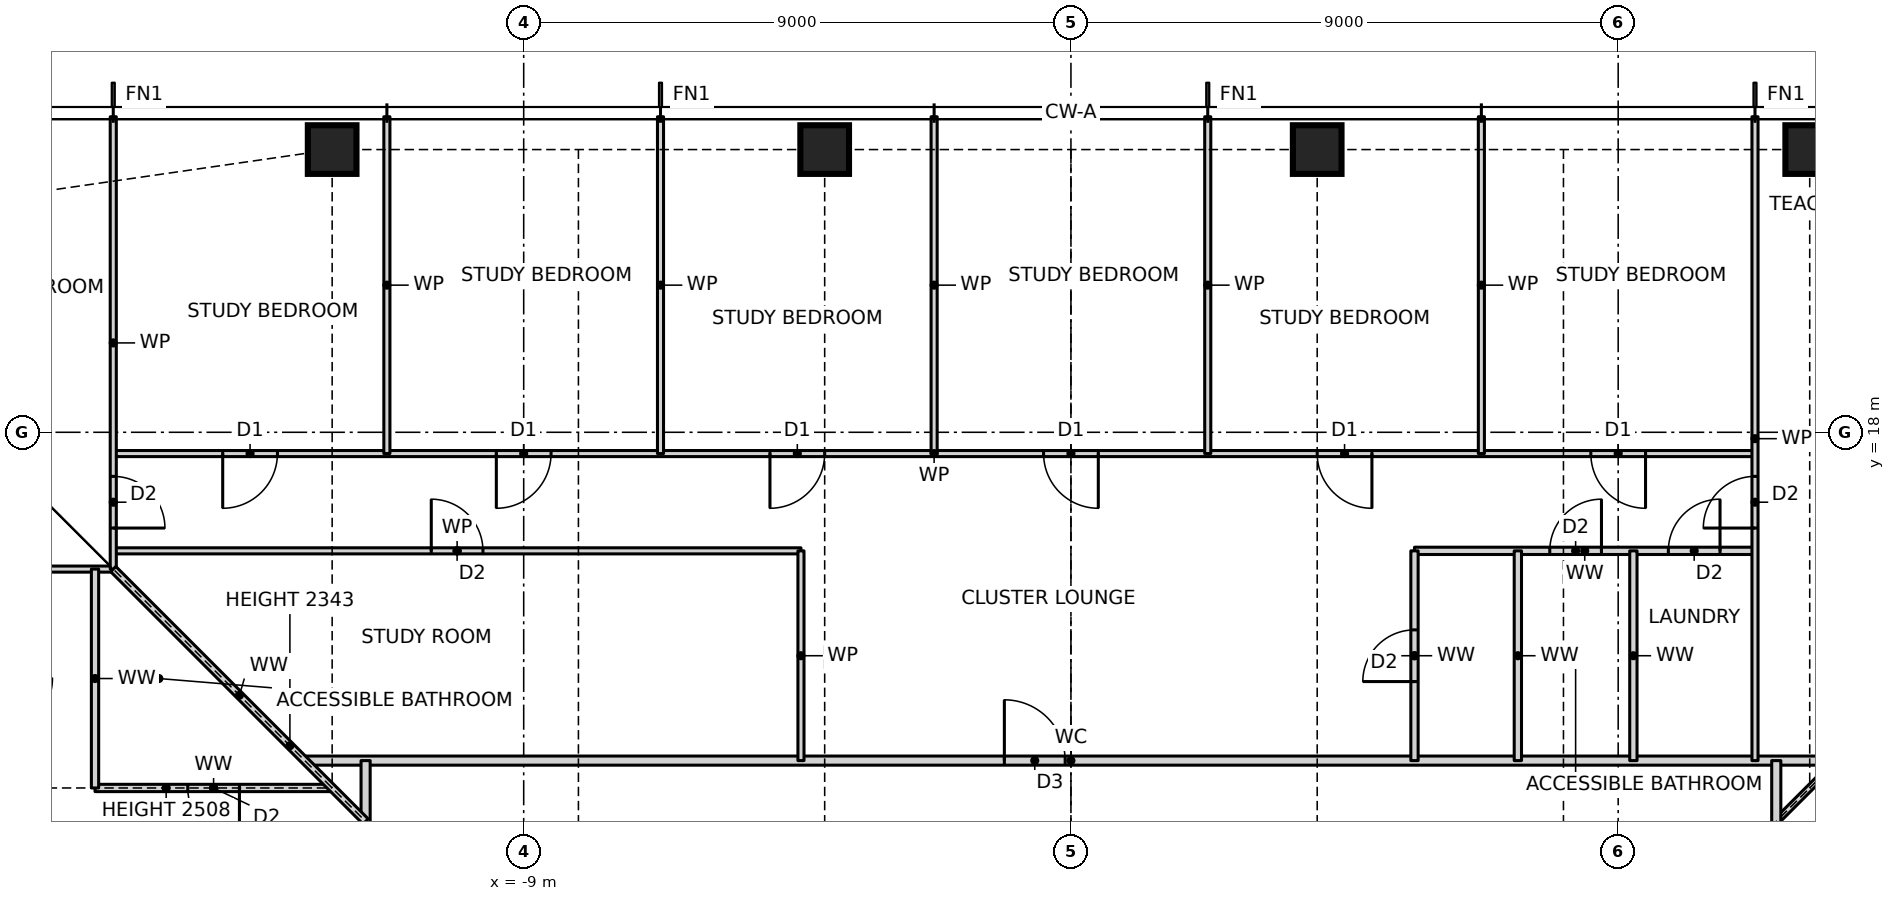
"""IFC4 building model, lengths in metres.
Left out: names, types, materials, properties, quantities, classifications, styles, units other than length and angle.
Written with IfcOpenShell. Run it as: python <this file> out.ifc"""

import sys

from ifc_helpers import new_model, si_unit, direction, frame, frame_2d, origin, origin_2d, place, context, subcontext, project, spatial, rectangle, hollow_rectangle, extrude, element, fill, save


model = new_model("IFC4")
c1 = context("Model", 3, precision=1e-05, world=origin(), true_north=direction((0.0, 1.0)))
c2 = subcontext(c1, "Body", "Model", "MODEL_VIEW")
j1 = project(units=[si_unit("LENGTHUNIT", "METRE"), si_unit("PLANEANGLEUNIT", "RADIAN")], contexts=[c1])
p1 = place(None, origin())
s1 = spatial("IfcSite", under=j1, at=p1, CompositionType="ELEMENT")
p2 = place(p1, origin())
s2 = spatial("IfcBuilding", under=s1, at=p2, CompositionType="ELEMENT")
p3 = place(p2, frame((0.0, 0.0, 57.0)))
s3 = spatial("IfcBuildingStorey", under=s2, at=p3, CompositionType="ELEMENT", Elevation=57.0)
for number, where, z_axis, x_axis in (
    (1, (12.15, 22.65, 0.0), (0.0, 0.0, 1.0), (1.0, 0.0, 0.0)),
    (2, (4.05, 22.65, 0.0), (0.0, 0.0, 1.0), (1.0, 0.0, 0.0)),
    (3, (-4.05, 22.65, 0.0), (0.0, 0.0, 1.0), (1.0, 0.0, 0.0)),
    (4, (-12.15, 22.65, 0.0), (0.0, 0.0, 1.0), (1.0, 0.0, 0.0)),
):
    element("IfcColumn", number, at=place(p3, frame(where, z_axis=z_axis, x_axis=x_axis)), inside=s3, PredefinedType="COLUMN", context=c2, shape_type="SweptSolid", body=[
        extrude(hollow_rectangle(XDim=0.8, YDim=0.8, WallThickness=0.09, at=origin_2d()), origin(), (0.0, 0.0, 1.0), 3.5),
    ])
p4 = place(p3, frame((-16.05, 12.15, 0.0), z_axis=(0.0, 0.0, 1.0), x_axis=(1.0, 0.0, 0.0)))
e5 = element("IfcWall", 5, at=p4, inside=s3, PredefinedType="PARTITIONING", context=c2, shape_type="SweptSolid", body=[
    extrude(rectangle(XDim=3.9, YDim=0.12, at=frame_2d((1.95, 0.0))), origin(), (0.0, 0.0, 1.0), 2.508),
])
p5 = place(p4, frame((1.525, 0.0, 0.0)))
e6 = element("IfcOpeningElement", 6, at=p5, cuts=e5, PredefinedType="OPENING", context=c2, shape_type="SweptSolid", body=[
    extrude(rectangle(XDim=0.85, YDim=2.1, at=frame_2d((0.425, 1.05))), frame((0.0, 0.07, 0.0), z_axis=(0.0, -1.0, 0.0), x_axis=(1.0, 0.0, 0.0)), (0.0, 0.0, 1.0), 0.14),
])
p6 = place(p3, frame((-12.6, 12.6, 0.0), z_axis=(0.0, 0.0, 1.0), x_axis=(1.0, 0.0, 0.0)))
e7 = element("IfcWall", 7, at=p6, inside=s3, PredefinedType="PARTITIONING", context=c2, shape_type="SweptSolid", body=[
    extrude(rectangle(XDim=25.2, YDim=0.15, at=frame_2d((12.6, 0.0))), origin(), (0.0, 0.0, 1.0), 3.27),
])
p7 = place(p6, frame((11.505, 0.0, 0.0)))
e8 = element("IfcOpeningElement", 8, at=p7, cuts=e7, PredefinedType="OPENING", context=c2, shape_type="SweptSolid", body=[
    extrude(rectangle(XDim=1.0, YDim=2.1, at=frame_2d((0.5, 1.05))), frame((0.0, 0.085, 0.0), z_axis=(0.0, -1.0, 0.0), x_axis=(1.0, 0.0, 0.0)), (0.0, 0.0, 1.0), 0.17),
])
p8 = place(p3, frame((-23.19, 15.75, 0.0), z_axis=(0.0, 0.0, 1.0), x_axis=(1.0, 0.0, 0.0)))
e9 = element("IfcWall", 9, at=p8, inside=s3, PredefinedType="PARTITIONING", context=c2, shape_type="SweptSolid", body=[
    extrude(rectangle(XDim=7.44, YDim=0.1, at=frame_2d((3.72, 0.0))), origin(), (0.0, 0.0, 1.0), 3.27),
])
p9 = place(p3, frame((-15.75, 16.05, 0.0), z_axis=(0.0, 0.0, 1.0), x_axis=(1.0, 0.0, 0.0)))
e10 = element("IfcWall", 10, at=p9, inside=s3, PredefinedType="PARTITIONING", context=c2, shape_type="SweptSolid", body=[
    extrude(rectangle(XDim=11.31, YDim=0.1, at=frame_2d((5.655, 0.0))), origin(), (0.0, 0.0, 1.0), 3.27),
])
p10 = place(p9, frame((5.23, 0.0, 0.0)))
e11 = element("IfcOpeningElement", 11, at=p10, cuts=e10, PredefinedType="OPENING", context=c2, shape_type="SweptSolid", body=[
    extrude(rectangle(XDim=0.85, YDim=2.1, at=frame_2d((0.425, 1.05))), frame((0.0, 0.06, 0.0), z_axis=(0.0, -1.0, 0.0), x_axis=(1.0, 0.0, 0.0)), (0.0, 0.0, 1.0), 0.12),
])
p11 = place(p3, frame((5.65, 16.05, 0.0), z_axis=(0.0, 0.0, 1.0), x_axis=(1.0, 0.0, 0.0)))
e12 = element("IfcWall", 12, at=p11, inside=s3, PredefinedType="PARTITIONING", context=c2, shape_type="SweptSolid", body=[
    extrude(rectangle(XDim=5.6, YDim=0.12, at=frame_2d((2.8, 0.0))), origin(), (0.0, 0.0, 1.0), 3.27),
])
p12 = place(p11, frame((4.175, 0.0, 0.0)))
e13 = element("IfcOpeningElement", 13, at=p12, cuts=e12, PredefinedType="OPENING", context=c2, shape_type="SweptSolid", body=[
    extrude(rectangle(XDim=0.85, YDim=2.1, at=frame_2d((0.425, 1.05))), frame((0.0, 0.07, 0.0), z_axis=(0.0, -1.0, 0.0), x_axis=(1.0, 0.0, 0.0)), (0.0, 0.0, 1.0), 0.14),
])
p13 = place(p11, frame((2.225, 0.0, 0.0)))
e14 = element("IfcOpeningElement", 14, at=p13, cuts=e12, PredefinedType="OPENING", context=c2, shape_type="SweptSolid", body=[
    extrude(rectangle(XDim=0.85, YDim=2.1, at=frame_2d((0.425, 1.05))), frame((0.0, 0.07, 0.0), z_axis=(0.0, -1.0, 0.0), x_axis=(1.0, 0.0, 0.0)), (0.0, 0.0, 1.0), 0.14),
])
p14 = place(p3, frame((-15.75, 17.65, 0.0), z_axis=(0.0, 0.0, 1.0), x_axis=(1.0, 0.0, 0.0)))
e15 = element("IfcWall", 15, at=p14, inside=s3, PredefinedType="PARTITIONING", context=c2, shape_type="SweptSolid", body=[
    extrude(rectangle(XDim=27.0, YDim=0.1, at=frame_2d((13.5, 0.0))), origin(), (0.0, 0.0, 1.0), 3.27),
])
p15 = place(p14, frame((24.3, 0.0, 0.0)))
e16 = element("IfcOpeningElement", 16, at=p15, cuts=e15, PredefinedType="OPENING", context=c2, shape_type="SweptSolid", body=[
    extrude(rectangle(XDim=0.9, YDim=2.1, at=frame_2d((0.45, 1.05))), frame((0.0, 0.06, 0.0), z_axis=(0.0, -1.0, 0.0), x_axis=(1.0, 0.0, 0.0)), (0.0, 0.0, 1.0), 0.12),
])
p16 = place(p14, frame((19.8, 0.0, 0.0)))
e17 = element("IfcOpeningElement", 17, at=p16, cuts=e15, PredefinedType="OPENING", context=c2, shape_type="SweptSolid", body=[
    extrude(rectangle(XDim=0.9, YDim=2.1, at=frame_2d((0.45, 1.05))), frame((0.0, 0.06, 0.0), z_axis=(0.0, -1.0, 0.0), x_axis=(1.0, 0.0, 0.0)), (0.0, 0.0, 1.0), 0.12),
])
p17 = place(p14, frame((15.3, 0.0, 0.0)))
e18 = element("IfcOpeningElement", 18, at=p17, cuts=e15, PredefinedType="OPENING", context=c2, shape_type="SweptSolid", body=[
    extrude(rectangle(XDim=0.9, YDim=2.1, at=frame_2d((0.45, 1.05))), frame((0.0, 0.06, 0.0), z_axis=(0.0, -1.0, 0.0), x_axis=(1.0, 0.0, 0.0)), (0.0, 0.0, 1.0), 0.12),
])
p18 = place(p14, frame((10.8, 0.0, 0.0)))
e19 = element("IfcOpeningElement", 19, at=p18, cuts=e15, PredefinedType="OPENING", context=c2, shape_type="SweptSolid", body=[
    extrude(rectangle(XDim=0.9, YDim=2.1, at=frame_2d((0.45, 1.05))), frame((0.0, 0.06, 0.0), z_axis=(0.0, -1.0, 0.0), x_axis=(1.0, 0.0, 0.0)), (0.0, 0.0, 1.0), 0.12),
])
p19 = place(p14, frame((6.3, 0.0, 0.0)))
e20 = element("IfcOpeningElement", 20, at=p19, cuts=e15, PredefinedType="OPENING", context=c2, shape_type="SweptSolid", body=[
    extrude(rectangle(XDim=0.9, YDim=2.1, at=frame_2d((0.45, 1.05))), frame((0.0, 0.06, 0.0), z_axis=(0.0, -1.0, 0.0), x_axis=(1.0, 0.0, 0.0)), (0.0, 0.0, 1.0), 0.12),
])
p20 = place(p14, frame((1.8, 0.0, 0.0)))
e21 = element("IfcOpeningElement", 21, at=p20, cuts=e15, PredefinedType="OPENING", context=c2, shape_type="SweptSolid", body=[
    extrude(rectangle(XDim=0.9, YDim=2.1, at=frame_2d((0.45, 1.05))), frame((0.0, 0.06, 0.0), z_axis=(0.0, -1.0, 0.0), x_axis=(1.0, 0.0, 0.0)), (0.0, 0.0, 1.0), 0.12),
])
p21 = place(p3, frame((11.6, 11.6, 0.0), z_axis=(0.0, 0.0, 1.0), x_axis=(0.707106781187, 0.707106781187, 0.0)))
e22 = element("IfcWall", 22, at=p21, inside=s3, PredefinedType="PARTITIONING", context=c2, shape_type="SweptSolid", body=[
    extrude(rectangle(XDim=5.869, YDim=0.1, at=frame_2d((2.935, 0.0))), origin(), (0.0, 0.0, 1.0), 2.343),
])
p22 = place(p3, frame((11.6, -11.6, 0.0), z_axis=(0.0, 0.0, 1.0), x_axis=(0.0, 1.0, 0.0)))
e23 = element("IfcWall", 23, at=p22, inside=s3, PredefinedType="PARTITIONING", context=c2, shape_type="SweptSolid", body=[
    extrude(rectangle(XDim=24.2, YDim=0.15, at=frame_2d((12.1, 0.0))), origin(), (0.0, 0.0, 1.0), 3.27),
])
p23 = place(p22, frame((16.05, 0.0, 0.0)))
e24 = element("IfcOpeningElement", 24, at=p23, cuts=e23, PredefinedType="OPENING", context=c2, shape_type="SweptSolid", body=[
    extrude(rectangle(XDim=1.0, YDim=2.1, at=frame_2d((0.5, 1.05))), frame((0.0, 0.085, 0.0), z_axis=(0.0, -1.0, 0.0), x_axis=(1.0, 0.0, 0.0)), (0.0, 0.0, 1.0), 0.17),
])
p24 = place(p3, frame((11.25, 12.6, 0.0), z_axis=(0.0, 0.0, 1.0), x_axis=(0.0, 1.0, 0.0)))
e25 = element("IfcWall", 25, at=p24, inside=s3, PredefinedType="PARTITIONING", context=c2, shape_type="SweptSolid", body=[
    extrude(rectangle(XDim=10.59, YDim=0.1, at=frame_2d((5.295, 0.0))), origin(), (0.0, 0.0, 1.0), 3.27),
])
p25 = place(p24, frame((3.825, 0.0, 0.0)))
e26 = element("IfcOpeningElement", 26, at=p25, cuts=e25, PredefinedType="OPENING", context=c2, shape_type="SweptSolid", body=[
    extrude(rectangle(XDim=0.85, YDim=2.1, at=frame_2d((0.425, 1.05))), frame((0.0, 0.06, 0.0), z_axis=(0.0, -1.0, 0.0), x_axis=(1.0, 0.0, 0.0)), (0.0, 0.0, 1.0), 0.12),
])
for number, where, z_axis, x_axis in (
    (27, (9.25, 12.6, 0.0), (0.0, 0.0, 1.0), (0.0, 1.0, 0.0)),
    (28, (7.35, 12.6, 0.0), (0.0, 0.0, 1.0), (0.0, 1.0, 0.0)),
):
    element("IfcWall", number, at=place(p3, frame(where, z_axis=z_axis, x_axis=x_axis)), inside=s3, PredefinedType="PARTITIONING", context=c2, shape_type="SweptSolid", body=[
        extrude(rectangle(XDim=3.45, YDim=0.12, at=frame_2d((1.725, 0.0))), origin(), (0.0, 0.0, 1.0), 3.27),
    ])
p26 = place(p3, frame((6.75, 17.65, 0.0), z_axis=(0.0, 0.0, 1.0), x_axis=(0.0, 1.0, 0.0)))
e29 = element("IfcWall", 29, at=p26, inside=s3, PredefinedType="PARTITIONING", context=c2, shape_type="SweptSolid", body=[
    extrude(rectangle(XDim=5.54, YDim=0.1, at=frame_2d((2.77, 0.0))), origin(), (0.0, 0.0, 1.0), 3.27),
])
p27 = place(p3, frame((5.65, 12.6, 0.0), z_axis=(0.0, 0.0, 1.0), x_axis=(0.0, 1.0, 0.0)))
e30 = element("IfcWall", 30, at=p27, inside=s3, PredefinedType="PARTITIONING", context=c2, shape_type="SweptSolid", body=[
    extrude(rectangle(XDim=3.45, YDim=0.12, at=frame_2d((1.725, 0.0))), origin(), (0.0, 0.0, 1.0), 3.27),
])
p28 = place(p27, frame((1.3, 0.0, 0.0)))
e31 = element("IfcOpeningElement", 31, at=p28, cuts=e30, PredefinedType="OPENING", context=c2, shape_type="SweptSolid", body=[
    extrude(rectangle(XDim=0.85, YDim=2.1, at=frame_2d((0.425, 1.05))), frame((0.0, 0.07, 0.0), z_axis=(0.0, -1.0, 0.0), x_axis=(1.0, 0.0, 0.0)), (0.0, 0.0, 1.0), 0.14),
])
for number, where, z_axis, x_axis in (
    (32, (2.25, 17.65, 0.0), (0.0, 0.0, 1.0), (0.0, 1.0, 0.0)),
    (33, (-2.25, 17.65, 0.0), (0.0, 0.0, 1.0), (0.0, 1.0, 0.0)),
):
    element("IfcWall", number, at=place(p3, frame(where, z_axis=z_axis, x_axis=x_axis)), inside=s3, PredefinedType="PARTITIONING", context=c2, shape_type="SweptSolid", body=[
        extrude(rectangle(XDim=5.54, YDim=0.1, at=frame_2d((2.77, 0.0))), origin(), (0.0, 0.0, 1.0), 3.27),
    ])
p29 = place(p3, frame((-4.44, 12.6, 0.0), z_axis=(0.0, 0.0, 1.0), x_axis=(0.0, 1.0, 0.0)))
e34 = element("IfcWall", 34, at=p29, inside=s3, PredefinedType="PARTITIONING", context=c2, shape_type="SweptSolid", body=[
    extrude(rectangle(XDim=3.45, YDim=0.1, at=frame_2d((1.725, 0.0))), origin(), (0.0, 0.0, 1.0), 3.27),
])
for number, where, z_axis, x_axis in (
    (35, (-6.75, 17.65, 0.0), (0.0, 0.0, 1.0), (0.0, 1.0, 0.0)),
    (36, (-11.25, 17.65, 0.0), (0.0, 0.0, 1.0), (0.0, 1.0, 0.0)),
):
    element("IfcWall", number, at=place(p3, frame(where, z_axis=z_axis, x_axis=x_axis)), inside=s3, PredefinedType="PARTITIONING", context=c2, shape_type="SweptSolid", body=[
        extrude(rectangle(XDim=5.54, YDim=0.1, at=frame_2d((2.77, 0.0))), origin(), (0.0, 0.0, 1.0), 3.27),
    ])
p30 = place(p3, frame((-11.6, -11.6, 0.0), z_axis=(0.0, 0.0, 1.0), x_axis=(0.0, 1.0, 0.0)))
e37 = element("IfcWall", 37, at=p30, inside=s3, PredefinedType="PARTITIONING", context=c2, shape_type="SweptSolid", body=[
    extrude(rectangle(XDim=24.2, YDim=0.15, at=frame_2d((12.1, 0.0))), origin(), (0.0, 0.0, 1.0), 3.27),
])
p31 = place(p30, frame((20.125, 0.0, 0.0)))
e38 = element("IfcOpeningElement", 38, at=p31, cuts=e37, PredefinedType="OPENING", context=c2, shape_type="SweptSolid", body=[
    extrude(rectangle(XDim=1.0, YDim=2.1, at=frame_2d((0.5, 1.05))), frame((0.0, 0.085, 0.0), z_axis=(0.0, -1.0, 0.0), x_axis=(1.0, 0.0, 0.0)), (0.0, 0.0, 1.0), 0.17),
])
p32 = place(p30, frame((14.3, 0.0, 0.0)))
e39 = element("IfcOpeningElement", 39, at=p32, cuts=e37, PredefinedType="OPENING", context=c2, shape_type="SweptSolid", body=[
    extrude(rectangle(XDim=0.9, YDim=2.1, at=frame_2d((0.45, 1.05))), frame((0.0, 0.085, 0.0), z_axis=(0.0, -1.0, 0.0), x_axis=(1.0, 0.0, 0.0)), (0.0, 0.0, 1.0), 0.17),
])
p33 = place(p30, frame((3.425, 0.0, 0.0)))
e40 = element("IfcOpeningElement", 40, at=p33, cuts=e37, PredefinedType="OPENING", context=c2, shape_type="SweptSolid", body=[
    extrude(rectangle(XDim=1.0, YDim=2.1, at=frame_2d((0.5, 1.05))), frame((0.0, 0.085, 0.0), z_axis=(0.0, -1.0, 0.0), x_axis=(1.0, 0.0, 0.0)), (0.0, 0.0, 1.0), 0.17),
])
p34 = place(p3, frame((-15.75, 15.75, 0.0), z_axis=(0.0, 0.0, 1.0), x_axis=(0.0, 1.0, 0.0)))
e41 = element("IfcWall", 41, at=p34, inside=s3, PredefinedType="PARTITIONING", context=c2, shape_type="SweptSolid", body=[
    extrude(rectangle(XDim=7.44, YDim=0.1, at=frame_2d((3.72, 0.0))), origin(), (0.0, 0.0, 1.0), 3.27),
])
p35 = place(p34, frame((0.675, 0.0, 0.0)))
e42 = element("IfcOpeningElement", 42, at=p35, cuts=e41, PredefinedType="OPENING", context=c2, shape_type="SweptSolid", body=[
    extrude(rectangle(XDim=0.85, YDim=2.1, at=frame_2d((0.425, 1.05))), frame((0.0, 0.06, 0.0), z_axis=(0.0, -1.0, 0.0), x_axis=(1.0, 0.0, 0.0)), (0.0, 0.0, 1.0), 0.12),
])
p36 = place(p3, frame((-16.05, 12.15, 0.0), z_axis=(0.0, 0.0, 1.0), x_axis=(0.0, 1.0, 0.0)))
e43 = element("IfcWall", 43, at=p36, inside=s3, PredefinedType="PARTITIONING", context=c2, shape_type="SweptSolid", body=[
    extrude(rectangle(XDim=3.6, YDim=0.12, at=frame_2d((1.8, 0.0))), origin(), (0.0, 0.0, 1.0), 3.27),
])
p37 = place(p3, frame((-11.6, 11.6, 0.0), z_axis=(0.0, 0.0, 1.0), x_axis=(-0.707106781187, 0.707106781187, 0.0)))
e44 = element("IfcWall", 44, at=p37, inside=s3, PredefinedType="PARTITIONING", context=c2, shape_type="SweptSolid", body=[
    extrude(rectangle(XDim=5.869, YDim=0.12, at=frame_2d((2.935, 0.0))), origin(), (0.0, 0.0, 1.0), 2.343),
])
p38 = place(p25, origin())
e45 = element("IfcDoor", 45, at=p38, inside=s3, OperationType="SINGLE_SWING_LEFT", PredefinedType="DOOR", context=c2, shape_type="SweptSolid", body=[
    extrude(rectangle(XDim=0.85, YDim=2.1, at=frame_2d((0.425, 1.05))), frame((0.0, 0.025, 0.0), z_axis=(0.0, -1.0, 0.0), x_axis=(1.0, 0.0, 0.0)), (0.0, 0.0, 1.0), 0.05),
])
fill(e26, e45)
p39 = place(p15, frame((0.9, 0.0, 0.0), z_axis=(0.0, 0.0, 1.0), x_axis=(-1.0, 0.0, 0.0)))
e46 = element("IfcDoor", 46, at=p39, inside=s3, OperationType="SINGLE_SWING_LEFT", PredefinedType="DOOR", context=c2, shape_type="SweptSolid", body=[
    extrude(rectangle(XDim=0.9, YDim=2.1, at=frame_2d((0.45, 1.05))), frame((0.0, 0.025, 0.0), z_axis=(0.0, -1.0, 0.0), x_axis=(1.0, 0.0, 0.0)), (0.0, 0.0, 1.0), 0.05),
])
fill(e16, e46)
p40 = place(p16, frame((0.9, 0.0, 0.0), z_axis=(0.0, 0.0, 1.0), x_axis=(-1.0, 0.0, 0.0)))
e47 = element("IfcDoor", 47, at=p40, inside=s3, OperationType="SINGLE_SWING_LEFT", PredefinedType="DOOR", context=c2, shape_type="SweptSolid", body=[
    extrude(rectangle(XDim=0.9, YDim=2.1, at=frame_2d((0.45, 1.05))), frame((0.0, 0.025, 0.0), z_axis=(0.0, -1.0, 0.0), x_axis=(1.0, 0.0, 0.0)), (0.0, 0.0, 1.0), 0.05),
])
fill(e17, e47)
p41 = place(p17, frame((0.9, 0.0, 0.0), z_axis=(0.0, 0.0, 1.0), x_axis=(-1.0, 0.0, 0.0)))
e48 = element("IfcDoor", 48, at=p41, inside=s3, OperationType="SINGLE_SWING_LEFT", PredefinedType="DOOR", context=c2, shape_type="SweptSolid", body=[
    extrude(rectangle(XDim=0.9, YDim=2.1, at=frame_2d((0.45, 1.05))), frame((0.0, 0.025, 0.0), z_axis=(0.0, -1.0, 0.0), x_axis=(1.0, 0.0, 0.0)), (0.0, 0.0, 1.0), 0.05),
])
fill(e18, e48)
p42 = place(p18, frame((0.9, 0.0, 0.0), z_axis=(0.0, 0.0, 1.0), x_axis=(-1.0, 0.0, 0.0)))
e49 = element("IfcDoor", 49, at=p42, inside=s3, OperationType="SINGLE_SWING_RIGHT", PredefinedType="DOOR", context=c2, shape_type="SweptSolid", body=[
    extrude(rectangle(XDim=0.9, YDim=2.1, at=frame_2d((0.45, 1.05))), frame((0.0, 0.025, 0.0), z_axis=(0.0, -1.0, 0.0), x_axis=(1.0, 0.0, 0.0)), (0.0, 0.0, 1.0), 0.05),
])
fill(e19, e49)
p43 = place(p19, frame((0.9, 0.0, 0.0), z_axis=(0.0, 0.0, 1.0), x_axis=(-1.0, 0.0, 0.0)))
e50 = element("IfcDoor", 50, at=p43, inside=s3, OperationType="SINGLE_SWING_RIGHT", PredefinedType="DOOR", context=c2, shape_type="SweptSolid", body=[
    extrude(rectangle(XDim=0.9, YDim=2.1, at=frame_2d((0.45, 1.05))), frame((0.0, 0.025, 0.0), z_axis=(0.0, -1.0, 0.0), x_axis=(1.0, 0.0, 0.0)), (0.0, 0.0, 1.0), 0.05),
])
fill(e20, e50)
p44 = place(p20, frame((0.9, 0.0, 0.0), z_axis=(0.0, 0.0, 1.0), x_axis=(-1.0, 0.0, 0.0)))
e51 = element("IfcDoor", 51, at=p44, inside=s3, OperationType="SINGLE_SWING_RIGHT", PredefinedType="DOOR", context=c2, shape_type="SweptSolid", body=[
    extrude(rectangle(XDim=0.9, YDim=2.1, at=frame_2d((0.45, 1.05))), frame((0.0, 0.025, 0.0), z_axis=(0.0, -1.0, 0.0), x_axis=(1.0, 0.0, 0.0)), (0.0, 0.0, 1.0), 0.05),
])
fill(e21, e51)
p45 = place(p7, origin())
e52 = element("IfcDoor", 52, at=p45, inside=s3, OperationType="SINGLE_SWING_LEFT", PredefinedType="DOOR", context=c2, shape_type="SweptSolid", body=[
    extrude(rectangle(XDim=1.0, YDim=2.1, at=frame_2d((0.5, 1.05))), frame((0.0, 0.025, 0.0), z_axis=(0.0, -1.0, 0.0), x_axis=(1.0, 0.0, 0.0)), (0.0, 0.0, 1.0), 0.05),
])
fill(e8, e52)
p46 = place(p12, origin())
e53 = element("IfcDoor", 53, at=p46, inside=s3, OperationType="SINGLE_SWING_RIGHT", PredefinedType="DOOR", context=c2, shape_type="SweptSolid", body=[
    extrude(rectangle(XDim=0.85, YDim=2.1, at=frame_2d((0.425, 1.05))), frame((0.0, 0.025, 0.0), z_axis=(0.0, -1.0, 0.0), x_axis=(1.0, 0.0, 0.0)), (0.0, 0.0, 1.0), 0.05),
])
fill(e13, e53)
p47 = place(p13, origin())
e54 = element("IfcDoor", 54, at=p47, inside=s3, OperationType="SINGLE_SWING_RIGHT", PredefinedType="DOOR", context=c2, shape_type="SweptSolid", body=[
    extrude(rectangle(XDim=0.85, YDim=2.1, at=frame_2d((0.425, 1.05))), frame((0.0, 0.025, 0.0), z_axis=(0.0, -1.0, 0.0), x_axis=(1.0, 0.0, 0.0)), (0.0, 0.0, 1.0), 0.05),
])
fill(e14, e54)
p48 = place(p28, origin())
e55 = element("IfcDoor", 55, at=p48, inside=s3, OperationType="SINGLE_SWING_LEFT", PredefinedType="DOOR", context=c2, shape_type="SweptSolid", body=[
    extrude(rectangle(XDim=0.85, YDim=2.1, at=frame_2d((0.425, 1.05))), frame((0.0, 0.025, 0.0), z_axis=(0.0, -1.0, 0.0), x_axis=(1.0, 0.0, 0.0)), (0.0, 0.0, 1.0), 0.05),
])
fill(e31, e55)
p49 = place(p10, origin())
e56 = element("IfcDoor", 56, at=p49, inside=s3, OperationType="SINGLE_SWING_LEFT", PredefinedType="DOOR", context=c2, shape_type="SweptSolid", body=[
    extrude(rectangle(XDim=0.85, YDim=2.1, at=frame_2d((0.425, 1.05))), frame((0.0, 0.025, 0.0), z_axis=(0.0, -1.0, 0.0), x_axis=(1.0, 0.0, 0.0)), (0.0, 0.0, 1.0), 0.05),
])
fill(e11, e56)
p50 = place(p5, frame((0.85, 0.0, 0.0), z_axis=(0.0, 0.0, 1.0), x_axis=(-1.0, 0.0, 0.0)))
e57 = element("IfcDoor", 57, at=p50, inside=s3, OperationType="SINGLE_SWING_LEFT", PredefinedType="DOOR", context=c2, shape_type="SweptSolid", body=[
    extrude(rectangle(XDim=0.85, YDim=2.1, at=frame_2d((0.425, 1.05))), frame((0.0, 0.025, 0.0), z_axis=(0.0, -1.0, 0.0), x_axis=(1.0, 0.0, 0.0)), (0.0, 0.0, 1.0), 0.05),
])
fill(e6, e57)
p51 = place(p35, frame((0.85, 0.0, 0.0), z_axis=(0.0, 0.0, 1.0), x_axis=(-1.0, 0.0, 0.0)))
e58 = element("IfcDoor", 58, at=p51, inside=s3, OperationType="SINGLE_SWING_RIGHT", PredefinedType="DOOR", context=c2, shape_type="SweptSolid", body=[
    extrude(rectangle(XDim=0.85, YDim=2.1, at=frame_2d((0.425, 1.05))), frame((0.0, 0.025, 0.0), z_axis=(0.0, -1.0, 0.0), x_axis=(1.0, 0.0, 0.0)), (0.0, 0.0, 1.0), 0.05),
])
fill(e42, e58)
save(model, sys.argv[1])
